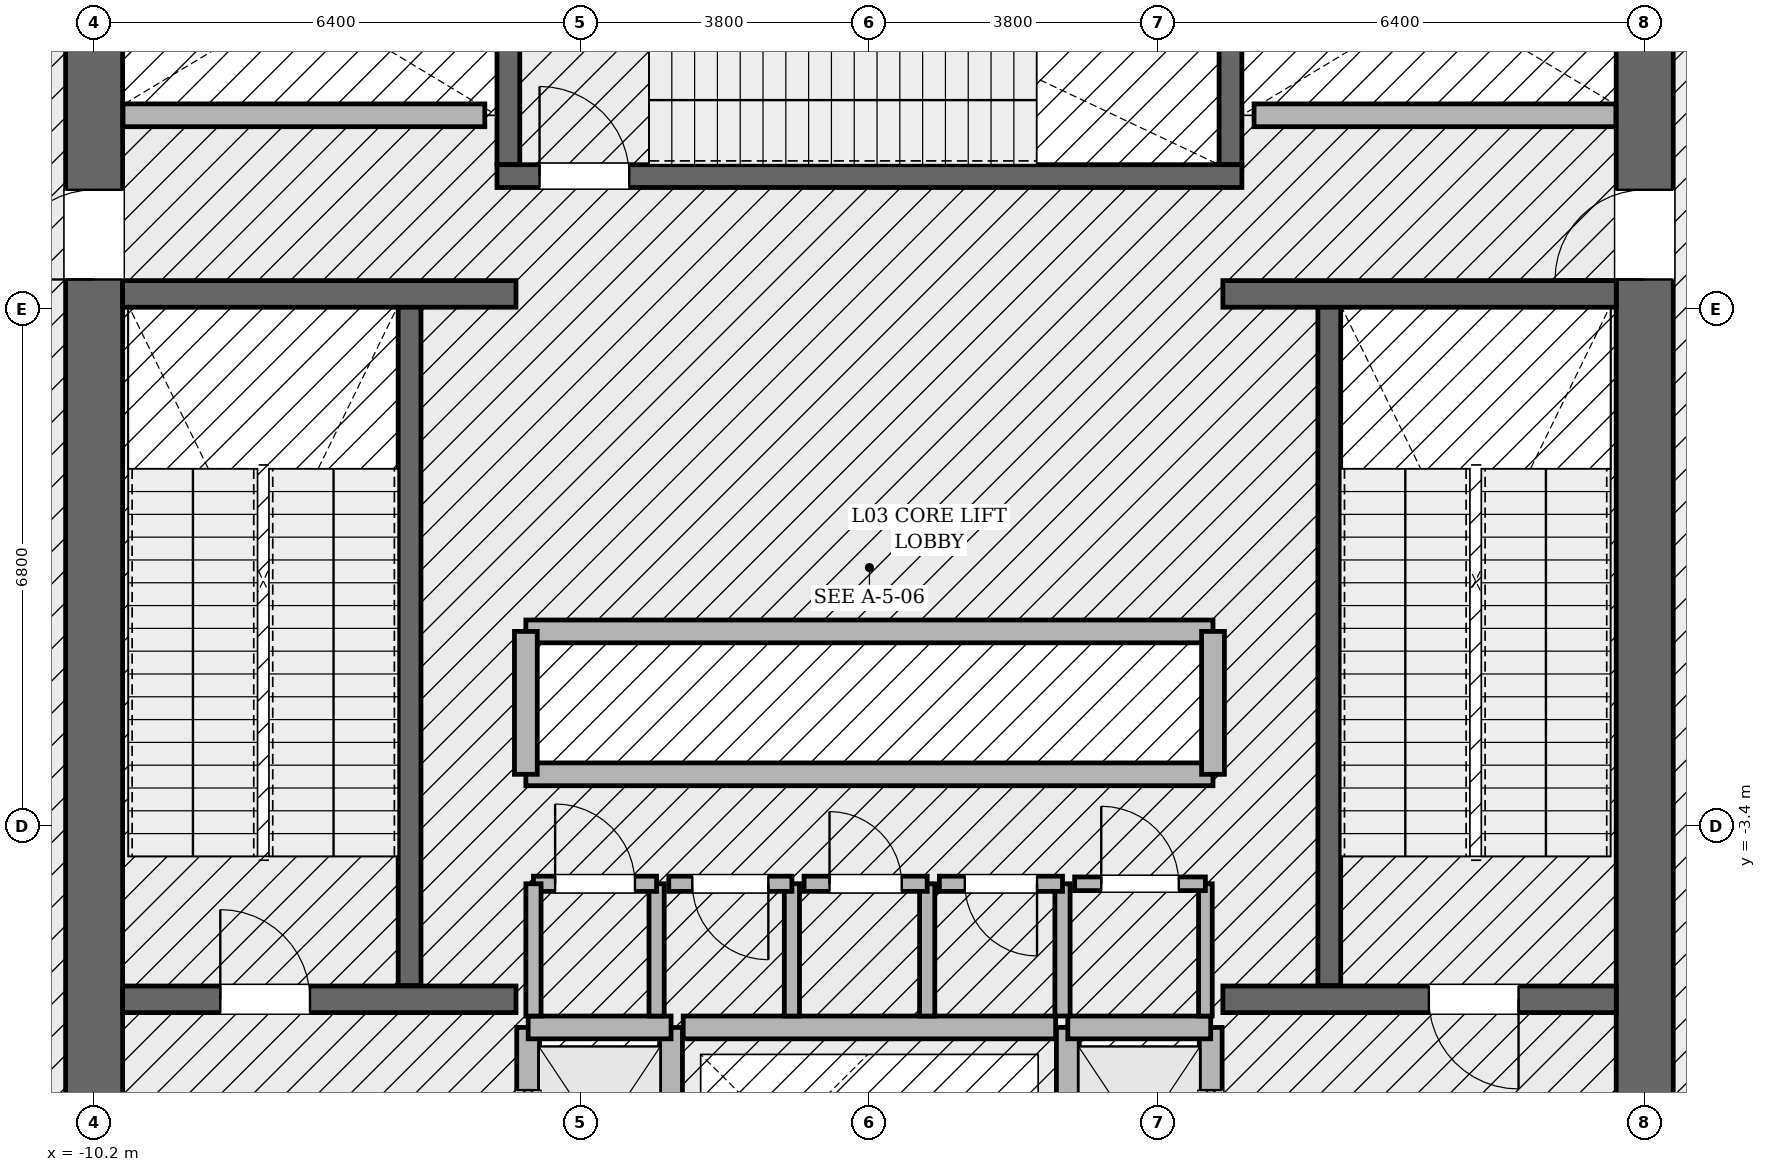
"""IFC4 building model, lengths in metres.
Left out: names, types, materials, properties, quantities, classifications, styles, units other than length and angle.
Written with IfcOpenShell. Run it as: python <this file> out.ifc"""

import sys

from ifc_helpers import new_model, si_unit, direction, frame, frame_2d, origin, place, context, subcontext, project, spatial, rectangle, extrude, element, fill, save


model = new_model("IFC4")
c1 = context("Model", 3, precision=1e-05, world=origin(), true_north=direction((0.0, 1.0)))
c2 = subcontext(c1, "Body", "Model", "MODEL_VIEW")
j1 = project(units=[si_unit("LENGTHUNIT", "METRE"), si_unit("PLANEANGLEUNIT", "RADIAN")], contexts=[c1])
p1 = place(None, origin())
s1 = spatial("IfcSite", under=j1, at=p1, CompositionType="ELEMENT")
p2 = place(p1, origin())
s2 = spatial("IfcBuilding", under=s1, at=p2, CompositionType="ELEMENT")
p3 = place(p2, frame((0.0, 0.0, 16.8)))
s3 = spatial("IfcBuildingStorey", under=s2, at=p3, CompositionType="ELEMENT", Elevation=16.8)
p4 = place(p3, frame((-10.2, -8.825, 0.0), z_axis=(0.0, 0.0, 1.0), x_axis=(0.0, 1.0, 0.0)))
e1 = element("IfcWall", 1, at=p4, inside=s3, PredefinedType="SHEAR", context=c2, shape_type="SweptSolid", body=[
    extrude(rectangle(XDim=17.65, YDim=0.75, at=frame_2d((8.825, 0.0))), origin(), (0.0, 0.0, 1.0), 5.4),
])
p5 = place(p4, frame((12.615, 0.0, 0.0)))
e2 = element("IfcOpeningElement", 2, at=p5, cuts=e1, PredefinedType="OPENING", context=c2, shape_type="SweptSolid", body=[
    extrude(rectangle(XDim=1.18, YDim=2.2, at=frame_2d((0.59, 1.1))), frame((0.0, 0.385, 0.0), z_axis=(0.0, -1.0, 0.0), x_axis=(1.0, 0.0, 0.0)), (0.0, 0.0, 1.0), 0.77),
])
p6 = place(p3, frame((10.2, 8.825, 0.0), z_axis=(0.0, 0.0, 1.0), x_axis=(0.0, -1.0, 0.0)))
e3 = element("IfcWall", 3, at=p6, inside=s3, PredefinedType="SHEAR", context=c2, shape_type="SweptSolid", body=[
    extrude(rectangle(XDim=17.65, YDim=0.75, at=frame_2d((8.825, 0.0))), origin(), (0.0, 0.0, 1.0), 5.4),
])
p7 = place(p6, frame((3.855, 0.0, 0.0)))
e4 = element("IfcOpeningElement", 4, at=p7, cuts=e3, PredefinedType="OPENING", context=c2, shape_type="SweptSolid", body=[
    extrude(rectangle(XDim=1.18, YDim=2.2, at=frame_2d((0.59, 1.1))), frame((0.0, 0.385, 0.0), z_axis=(0.0, -1.0, 0.0), x_axis=(1.0, 0.0, 0.0)), (0.0, 0.0, 1.0), 0.77),
])
for number, where, z_axis, x_axis in (
    (5, (-6.05, -5.5, 0.0), (0.0, 0.0, 1.0), (0.0, 1.0, 0.0)),
    (6, (6.05, 3.45, 0.0), (0.0, 0.0, 1.0), (0.0, -1.0, 0.0)),
):
    element("IfcWall", number, at=place(p3, frame(where, z_axis=z_axis, x_axis=x_axis)), inside=s3, PredefinedType="SOLIDWALL", context=c2, shape_type="SweptSolid", body=[
        extrude(rectangle(XDim=8.95, YDim=0.3, at=frame_2d((4.475, 0.0))), origin(), (0.0, 0.0, 1.0), 5.4),
    ])
for number, where, z_axis, x_axis in (
    (7, (-4.75, 5.3, 0.0), (0.0, 0.0, 1.0), (0.0, 1.0, 0.0)),
    (8, (4.75, 8.825, 0.0), (0.0, 0.0, 1.0), (0.0, -1.0, 0.0)),
):
    element("IfcWall", number, at=place(p3, frame(where, z_axis=z_axis, x_axis=x_axis)), inside=s3, PredefinedType="SOLIDWALL", context=c2, shape_type="SweptSolid", body=[
        extrude(rectangle(XDim=3.525, YDim=0.3, at=frame_2d((1.762, 0.0))), origin(), (0.0, 0.0, 1.0), 5.4),
    ])
p8 = place(p3, frame((-4.9, 5.15, 0.0), z_axis=(0.0, 0.0, 1.0), x_axis=(1.0, 0.0, 0.0)))
e9 = element("IfcWall", 9, at=p8, inside=s3, PredefinedType="SOLIDWALL", context=c2, shape_type="SweptSolid", body=[
    extrude(rectangle(XDim=9.8, YDim=0.3, at=frame_2d((4.9, 0.0))), origin(), (0.0, 0.0, 1.0), 5.4),
])
p9 = place(p8, frame((0.56, 0.0, 0.0)))
e10 = element("IfcOpeningElement", 10, at=p9, cuts=e9, PredefinedType="OPENING", context=c2, shape_type="SweptSolid", body=[
    extrude(rectangle(XDim=1.18, YDim=2.2, at=frame_2d((0.59, 1.1))), frame((0.0, 0.16, 0.0), z_axis=(0.0, -1.0, 0.0), x_axis=(1.0, 0.0, 0.0)), (0.0, 0.0, 1.0), 0.32),
])
p10 = place(p3, frame((-9.825, -5.68, 0.0), z_axis=(0.0, 0.0, 1.0), x_axis=(1.0, 0.0, 0.0)))
e11 = element("IfcWall", 11, at=p10, inside=s3, PredefinedType="SOLIDWALL", context=c2, shape_type="SweptSolid", body=[
    extrude(rectangle(XDim=5.175, YDim=0.35, at=frame_2d((2.587, 0.0))), origin(), (0.0, 0.0, 1.0), 5.4),
])
p11 = place(p10, frame((1.285, 0.0, 0.0)))
e12 = element("IfcOpeningElement", 12, at=p11, cuts=e11, PredefinedType="OPENING", context=c2, shape_type="SweptSolid", body=[
    extrude(rectangle(XDim=1.18, YDim=2.2, at=frame_2d((0.59, 1.1))), frame((0.0, 0.185, 0.0), z_axis=(0.0, -1.0, 0.0), x_axis=(1.0, 0.0, 0.0)), (0.0, 0.0, 1.0), 0.37),
])
p12 = place(p3, frame((4.65, -5.68, 0.0), z_axis=(0.0, 0.0, 1.0), x_axis=(1.0, 0.0, 0.0)))
e13 = element("IfcWall", 13, at=p12, inside=s3, PredefinedType="SOLIDWALL", context=c2, shape_type="SweptSolid", body=[
    extrude(rectangle(XDim=5.175, YDim=0.35, at=frame_2d((2.587, 0.0))), origin(), (0.0, 0.0, 1.0), 5.4),
])
p13 = place(p12, frame((2.71, 0.0, 0.0)))
e14 = element("IfcOpeningElement", 14, at=p13, cuts=e13, PredefinedType="OPENING", context=c2, shape_type="SweptSolid", body=[
    extrude(rectangle(XDim=1.18, YDim=2.2, at=frame_2d((0.59, 1.1))), frame((0.0, 0.185, 0.0), z_axis=(0.0, -1.0, 0.0), x_axis=(1.0, 0.0, 0.0)), (0.0, 0.0, 1.0), 0.37),
])
for number, where, z_axis, x_axis in (
    (15, (-9.825, 3.6, 0.0), (0.0, 0.0, 1.0), (1.0, 0.0, 0.0)),
    (16, (4.65, 3.6, 0.0), (0.0, 0.0, 1.0), (1.0, 0.0, 0.0)),
):
    element("IfcWall", number, at=place(p3, frame(where, z_axis=z_axis, x_axis=x_axis)), inside=s3, PredefinedType="SOLIDWALL", context=c2, shape_type="SweptSolid", body=[
        extrude(rectangle(XDim=5.175, YDim=0.35, at=frame_2d((2.587, 0.0))), origin(), (0.0, 0.0, 1.0), 5.4),
    ])
p14 = place(p3, frame((-4.49, -8.82, 0.0), z_axis=(0.0, 0.0, 1.0), x_axis=(0.0, 1.0, 0.0)))
e17 = element("IfcWall", 17, at=p14, inside=s3, PredefinedType="SOLIDWALL", context=c2, shape_type="SweptSolid", body=[
    extrude(rectangle(XDim=2.77, YDim=0.3, at=frame_2d((1.385, 0.0))), origin(), (0.0, 0.0, 1.0), 5.02),
])
p15 = place(p14, frame((0.825, 0.0, 0.0)))
e18 = element("IfcOpeningElement", 18, at=p15, cuts=e17, PredefinedType="OPENING", context=c2, shape_type="SweptSolid", body=[
    extrude(rectangle(XDim=1.12, YDim=2.25, at=frame_2d((0.56, 1.125))), frame((0.0, 0.16, 0.0), z_axis=(0.0, -1.0, 0.0), x_axis=(1.0, 0.0, 0.0)), (0.0, 0.0, 1.0), 0.32),
])
p16 = place(p3, frame((-2.61, -8.82, 0.0), z_axis=(0.0, 0.0, 1.0), x_axis=(0.0, 1.0, 0.0)))
e19 = element("IfcWall", 19, at=p16, inside=s3, PredefinedType="SOLIDWALL", context=c2, shape_type="SweptSolid", body=[
    extrude(rectangle(XDim=2.77, YDim=0.3, at=frame_2d((1.385, 0.0))), origin(), (0.0, 0.0, 1.0), 5.02),
])
p17 = place(p3, frame((-4.49, -6.05, 0.0), z_axis=(0.0, 0.0, 1.0), x_axis=(1.0, 0.0, 0.0)))
e20 = element("IfcWall", 20, at=p17, inside=s3, PredefinedType="SOLIDWALL", context=c2, shape_type="SweptSolid", body=[
    extrude(rectangle(XDim=1.88, YDim=0.3, at=frame_2d((0.94, 0.0))), origin(), (0.0, 0.0, 1.0), 5.02),
])
p18 = place(p3, frame((4.49, -8.82, 0.0), z_axis=(0.0, 0.0, 1.0), x_axis=(0.0, 1.0, 0.0)))
e21 = element("IfcWall", 21, at=p18, inside=s3, PredefinedType="SOLIDWALL", context=c2, shape_type="SweptSolid", body=[
    extrude(rectangle(XDim=2.77, YDim=0.3, at=frame_2d((1.385, 0.0))), origin(), (0.0, 0.0, 1.0), 5.02),
])
p19 = place(p18, frame((0.825, 0.0, 0.0)))
e22 = element("IfcOpeningElement", 22, at=p19, cuts=e21, PredefinedType="OPENING", context=c2, shape_type="SweptSolid", body=[
    extrude(rectangle(XDim=1.12, YDim=2.25, at=frame_2d((0.56, 1.125))), frame((0.0, 0.16, 0.0), z_axis=(0.0, -1.0, 0.0), x_axis=(1.0, 0.0, 0.0)), (0.0, 0.0, 1.0), 0.32),
])
p20 = place(p3, frame((2.61, -8.82, 0.0), z_axis=(0.0, 0.0, 1.0), x_axis=(0.0, 1.0, 0.0)))
e23 = element("IfcWall", 23, at=p20, inside=s3, PredefinedType="SOLIDWALL", context=c2, shape_type="SweptSolid", body=[
    extrude(rectangle(XDim=2.77, YDim=0.3, at=frame_2d((1.385, 0.0))), origin(), (0.0, 0.0, 1.0), 5.02),
])
p21 = place(p3, frame((2.61, -6.05, 0.0), z_axis=(0.0, 0.0, 1.0), x_axis=(1.0, 0.0, 0.0)))
e24 = element("IfcWall", 24, at=p21, inside=s3, PredefinedType="SOLIDWALL", context=c2, shape_type="SweptSolid", body=[
    extrude(rectangle(XDim=1.88, YDim=0.3, at=frame_2d((0.94, 0.0))), origin(), (0.0, 0.0, 1.0), 5.02),
])
for number, where, z_axis, x_axis in (
    (25, (-4.52, -0.84, 0.0), (0.0, 0.0, 1.0), (1.0, 0.0, 0.0)),
    (26, (-4.52, -2.72, 0.0), (0.0, 0.0, 1.0), (1.0, 0.0, 0.0)),
):
    element("IfcWall", number, at=place(p3, frame(where, z_axis=z_axis, x_axis=x_axis)), inside=s3, PredefinedType="SOLIDWALL", context=c2, shape_type="SweptSolid", body=[
        extrude(rectangle(XDim=9.04, YDim=0.3, at=frame_2d((4.52, 0.0))), origin(), (0.0, 0.0, 1.0), 5.02),
    ])
for number, where, z_axis, x_axis in (
    (27, (-4.52, -2.72, 0.0), (0.0, 0.0, 1.0), (0.0, 1.0, 0.0)),
    (28, (4.52, -2.72, 0.0), (0.0, 0.0, 1.0), (0.0, 1.0, 0.0)),
):
    element("IfcWall", number, at=place(p3, frame(where, z_axis=z_axis, x_axis=x_axis)), inside=s3, PredefinedType="SOLIDWALL", context=c2, shape_type="SweptSolid", body=[
        extrude(rectangle(XDim=1.88, YDim=0.3, at=frame_2d((0.94, 0.0))), origin(), (0.0, 0.0, 1.0), 5.02),
    ])
for number, where, z_axis, x_axis in (
    (29, (-9.82, 5.95, 0.0), (0.0, 0.0, 1.0), (1.0, 0.0, 0.0)),
    (30, (5.06, 5.95, 0.0), (0.0, 0.0, 1.0), (1.0, 0.0, 0.0)),
):
    element("IfcWall", number, at=place(p3, frame(where, z_axis=z_axis, x_axis=x_axis)), inside=s3, PredefinedType="SOLIDWALL", context=c2, shape_type="SweptSolid", body=[
        extrude(rectangle(XDim=4.76, YDim=0.3, at=frame_2d((2.38, 0.0))), origin(), (0.0, 0.0, 1.0), 5.02),
    ])
p22 = place(p3, frame((-2.45, -6.05, 0.0), z_axis=(0.0, 0.0, 1.0), x_axis=(1.0, 0.0, 0.0)))
e31 = element("IfcWall", 31, at=p22, inside=s3, PredefinedType="SOLIDWALL", context=c2, shape_type="SweptSolid", body=[
    extrude(rectangle(XDim=4.9, YDim=0.3, at=frame_2d((2.45, 0.0))), origin(), (0.0, 0.0, 1.0), 5.02),
])
p23 = place(p3, frame((-2.8, -5.9, 0.0), z_axis=(0.0, 0.0, 1.0), x_axis=(0.0, 1.0, 0.0)))
e32 = element("IfcWall", 32, at=p23, inside=s3, PredefinedType="SOLIDWALL", context=c2, shape_type="SweptSolid", body=[
    extrude(rectangle(XDim=1.74, YDim=0.2, at=frame_2d((0.87, 0.0))), origin(), (0.0, 0.0, 1.0), 5.02),
])
p24 = place(p3, frame((-2.8, -4.16, 0.0), z_axis=(0.0, 0.0, 1.0), x_axis=(-1.0, 0.0, 0.0)))
e33 = element("IfcWall", 33, at=p24, inside=s3, PredefinedType="SOLIDWALL", context=c2, shape_type="SweptSolid", body=[
    extrude(rectangle(XDim=1.62, YDim=0.2, at=frame_2d((0.81, 0.0))), origin(), (0.0, 0.0, 1.0), 5.02),
])
p25 = place(p24, frame((0.285, 0.0, 0.0)))
e34 = element("IfcOpeningElement", 34, at=p25, cuts=e33, PredefinedType="OPENING", context=c2, shape_type="SweptSolid", body=[
    extrude(rectangle(XDim=1.05, YDim=2.2, at=frame_2d((0.525, 1.1))), frame((0.0, 0.11, 0.0), z_axis=(0.0, -1.0, 0.0), x_axis=(1.0, 0.0, 0.0)), (0.0, 0.0, 1.0), 0.22),
])
for number, where, z_axis, x_axis in (
    (35, (-4.42, -4.16, 0.0), (0.0, 0.0, 1.0), (0.0, -1.0, 0.0)),
    (36, (-1.02, -5.9, 0.0), (0.0, 0.0, 1.0), (0.0, 1.0, 0.0)),
):
    element("IfcWall", number, at=place(p3, frame(where, z_axis=z_axis, x_axis=x_axis)), inside=s3, PredefinedType="SOLIDWALL", context=c2, shape_type="SweptSolid", body=[
        extrude(rectangle(XDim=1.74, YDim=0.2, at=frame_2d((0.87, 0.0))), origin(), (0.0, 0.0, 1.0), 5.02),
    ])
p26 = place(p3, frame((-1.02, -4.16, 0.0), z_axis=(0.0, 0.0, 1.0), x_axis=(-1.0, 0.0, 0.0)))
e37 = element("IfcWall", 37, at=p26, inside=s3, PredefinedType="SOLIDWALL", context=c2, shape_type="SweptSolid", body=[
    extrude(rectangle(XDim=1.62, YDim=0.2, at=frame_2d((0.81, 0.0))), origin(), (0.0, 0.0, 1.0), 5.02),
])
p27 = place(p26, frame((0.31, 0.0, 0.0)))
e38 = element("IfcOpeningElement", 38, at=p27, cuts=e37, PredefinedType="OPENING", context=c2, shape_type="SweptSolid", body=[
    extrude(rectangle(XDim=1.0, YDim=2.15, at=frame_2d((0.5, 1.075))), frame((0.0, 0.11, 0.0), z_axis=(0.0, -1.0, 0.0), x_axis=(1.0, 0.0, 0.0)), (0.0, 0.0, 1.0), 0.22),
])
p28 = place(p3, frame((0.76, -5.9, 0.0), z_axis=(0.0, 0.0, 1.0), x_axis=(0.0, 1.0, 0.0)))
e39 = element("IfcWall", 39, at=p28, inside=s3, PredefinedType="SOLIDWALL", context=c2, shape_type="SweptSolid", body=[
    extrude(rectangle(XDim=1.74, YDim=0.2, at=frame_2d((0.87, 0.0))), origin(), (0.0, 0.0, 1.0), 5.02),
])
p29 = place(p3, frame((0.76, -4.16, 0.0), z_axis=(0.0, 0.0, 1.0), x_axis=(-1.0, 0.0, 0.0)))
e40 = element("IfcWall", 40, at=p29, inside=s3, PredefinedType="SOLIDWALL", context=c2, shape_type="SweptSolid", body=[
    extrude(rectangle(XDim=1.62, YDim=0.2, at=frame_2d((0.81, 0.0))), origin(), (0.0, 0.0, 1.0), 5.02),
])
p30 = place(p29, frame((0.335, 0.0, 0.0)))
e41 = element("IfcOpeningElement", 41, at=p30, cuts=e40, PredefinedType="OPENING", context=c2, shape_type="SweptSolid", body=[
    extrude(rectangle(XDim=0.95, YDim=2.15, at=frame_2d((0.475, 1.075))), frame((0.0, 0.11, 0.0), z_axis=(0.0, -1.0, 0.0), x_axis=(1.0, 0.0, 0.0)), (0.0, 0.0, 1.0), 0.22),
])
p31 = place(p3, frame((2.54, -5.9, 0.0), z_axis=(0.0, 0.0, 1.0), x_axis=(0.0, 1.0, 0.0)))
e42 = element("IfcWall", 42, at=p31, inside=s3, PredefinedType="SOLIDWALL", context=c2, shape_type="SweptSolid", body=[
    extrude(rectangle(XDim=1.74, YDim=0.2, at=frame_2d((0.87, 0.0))), origin(), (0.0, 0.0, 1.0), 5.02),
])
p32 = place(p3, frame((2.54, -4.16, 0.0), z_axis=(0.0, 0.0, 1.0), x_axis=(-1.0, 0.0, 0.0)))
e43 = element("IfcWall", 43, at=p32, inside=s3, PredefinedType="SOLIDWALL", context=c2, shape_type="SweptSolid", body=[
    extrude(rectangle(XDim=1.62, YDim=0.2, at=frame_2d((0.81, 0.0))), origin(), (0.0, 0.0, 1.0), 5.02),
])
p33 = place(p32, frame((0.335, 0.0, 0.0)))
e44 = element("IfcOpeningElement", 44, at=p33, cuts=e43, PredefinedType="OPENING", context=c2, shape_type="SweptSolid", body=[
    extrude(rectangle(XDim=0.95, YDim=2.15, at=frame_2d((0.475, 1.075))), frame((0.0, 0.11, 0.0), z_axis=(0.0, -1.0, 0.0), x_axis=(1.0, 0.0, 0.0)), (0.0, 0.0, 1.0), 0.22),
])
p34 = place(p3, frame((4.42, -5.9, 0.0), z_axis=(0.0, 0.0, 1.0), x_axis=(0.0, 1.0, 0.0)))
e45 = element("IfcWall", 45, at=p34, inside=s3, PredefinedType="PARTITIONING", context=c2, shape_type="SweptSolid", body=[
    extrude(rectangle(XDim=1.74, YDim=0.18, at=frame_2d((0.87, 0.0))), origin(), (0.0, 0.0, 1.0), 5.02),
])
p35 = place(p3, frame((4.42, -4.16, 0.0), z_axis=(0.0, 0.0, 1.0), x_axis=(-1.0, 0.0, 0.0)))
e46 = element("IfcWall", 46, at=p35, inside=s3, PredefinedType="PARTITIONING", context=c2, shape_type="SweptSolid", body=[
    extrude(rectangle(XDim=1.72, YDim=0.18, at=frame_2d((0.86, 0.0))), origin(), (0.0, 0.0, 1.0), 5.02),
])
p36 = place(p35, frame((0.35, 0.0, 0.0)))
e47 = element("IfcOpeningElement", 47, at=p36, cuts=e46, PredefinedType="OPENING", context=c2, shape_type="SweptSolid", body=[
    extrude(rectangle(XDim=1.02, YDim=2.2, at=frame_2d((0.51, 1.1))), frame((0.0, 0.1, 0.0), z_axis=(0.0, -1.0, 0.0), x_axis=(1.0, 0.0, 0.0)), (0.0, 0.0, 1.0), 0.2),
])
p37 = place(p11, origin())
e48 = element("IfcDoor", 48, at=p37, inside=s3, OperationType="SINGLE_SWING_LEFT", PredefinedType="DOOR", context=c2, shape_type="SweptSolid", body=[
    extrude(rectangle(XDim=1.18, YDim=2.2, at=frame_2d((0.59, 1.1))), frame((0.0, 0.025, 0.0), z_axis=(0.0, -1.0, 0.0), x_axis=(1.0, 0.0, 0.0)), (0.0, 0.0, 1.0), 0.05),
])
fill(e12, e48)
p38 = place(p13, origin())
e49 = element("IfcDoor", 49, at=p38, inside=s3, OperationType="SINGLE_SWING_RIGHT", PredefinedType="DOOR", context=c2, shape_type="SweptSolid", body=[
    extrude(rectangle(XDim=1.18, YDim=2.2, at=frame_2d((0.59, 1.1))), frame((0.0, 0.025, 0.0), z_axis=(0.0, -1.0, 0.0), x_axis=(1.0, 0.0, 0.0)), (0.0, 0.0, 1.0), 0.05),
])
fill(e14, e49)
p39 = place(p9, origin())
e50 = element("IfcDoor", 50, at=p39, inside=s3, OperationType="SINGLE_SWING_LEFT", PredefinedType="DOOR", context=c2, shape_type="SweptSolid", body=[
    extrude(rectangle(XDim=1.18, YDim=2.2, at=frame_2d((0.59, 1.1))), frame((0.0, 0.025, 0.0), z_axis=(0.0, -1.0, 0.0), x_axis=(1.0, 0.0, 0.0)), (0.0, 0.0, 1.0), 0.05),
])
fill(e10, e50)
p40 = place(p5, origin())
e51 = element("IfcDoor", 51, at=p40, inside=s3, OperationType="SINGLE_SWING_LEFT", PredefinedType="DOOR", context=c2, shape_type="SweptSolid", body=[
    extrude(rectangle(XDim=1.18, YDim=2.2, at=frame_2d((0.59, 1.1))), frame((0.0, 0.025, 0.0), z_axis=(0.0, -1.0, 0.0), x_axis=(1.0, 0.0, 0.0)), (0.0, 0.0, 1.0), 0.05),
])
fill(e2, e51)
p41 = place(p7, origin())
e52 = element("IfcDoor", 52, at=p41, inside=s3, OperationType="SINGLE_SWING_RIGHT", PredefinedType="DOOR", context=c2, shape_type="SweptSolid", body=[
    extrude(rectangle(XDim=1.18, YDim=2.2, at=frame_2d((0.59, 1.1))), frame((0.0, 0.025, 0.0), z_axis=(0.0, -1.0, 0.0), x_axis=(1.0, 0.0, 0.0)), (0.0, 0.0, 1.0), 0.05),
])
fill(e4, e52)
p42 = place(p15, origin())
e53 = element("IfcDoor", 53, at=p42, inside=s3, OperationType="SLIDING_TO_LEFT", PredefinedType="DOOR", context=c2, shape_type="SweptSolid", body=[
    extrude(rectangle(XDim=1.12, YDim=2.25, at=frame_2d((0.56, 1.125))), frame((0.0, 0.025, 0.0), z_axis=(0.0, -1.0, 0.0), x_axis=(1.0, 0.0, 0.0)), (0.0, 0.0, 1.0), 0.05),
])
fill(e18, e53)
p43 = place(p19, origin())
e54 = element("IfcDoor", 54, at=p43, inside=s3, OperationType="SLIDING_TO_RIGHT", PredefinedType="DOOR", context=c2, shape_type="SweptSolid", body=[
    extrude(rectangle(XDim=1.12, YDim=2.25, at=frame_2d((0.56, 1.125))), frame((0.0, 0.025, 0.0), z_axis=(0.0, -1.0, 0.0), x_axis=(1.0, 0.0, 0.0)), (0.0, 0.0, 1.0), 0.05),
])
fill(e22, e54)
p44 = place(p25, origin())
e55 = element("IfcDoor", 55, at=p44, inside=s3, OperationType="SINGLE_SWING_RIGHT", PredefinedType="DOOR", context=c2, shape_type="SweptSolid", body=[
    extrude(rectangle(XDim=1.05, YDim=2.2, at=frame_2d((0.525, 1.1))), frame((0.0, 0.025, 0.0), z_axis=(0.0, -1.0, 0.0), x_axis=(1.0, 0.0, 0.0)), (0.0, 0.0, 1.0), 0.05),
])
fill(e34, e55)
p45 = place(p27, origin())
e56 = element("IfcDoor", 56, at=p45, inside=s3, OperationType="SINGLE_SWING_LEFT", PredefinedType="DOOR", context=c2, shape_type="SweptSolid", body=[
    extrude(rectangle(XDim=1.0, YDim=2.15, at=frame_2d((0.5, 1.075))), frame((0.0, 0.025, 0.0), z_axis=(0.0, -1.0, 0.0), x_axis=(1.0, 0.0, 0.0)), (0.0, 0.0, 1.0), 0.05),
])
fill(e38, e56)
p46 = place(p30, origin())
e57 = element("IfcDoor", 57, at=p46, inside=s3, OperationType="SINGLE_SWING_RIGHT", PredefinedType="DOOR", context=c2, shape_type="SweptSolid", body=[
    extrude(rectangle(XDim=0.95, YDim=2.15, at=frame_2d((0.475, 1.075))), frame((0.0, 0.025, 0.0), z_axis=(0.0, -1.0, 0.0), x_axis=(1.0, 0.0, 0.0)), (0.0, 0.0, 1.0), 0.05),
])
fill(e41, e57)
p47 = place(p33, origin())
e58 = element("IfcDoor", 58, at=p47, inside=s3, OperationType="SINGLE_SWING_LEFT", PredefinedType="DOOR", context=c2, shape_type="SweptSolid", body=[
    extrude(rectangle(XDim=0.95, YDim=2.15, at=frame_2d((0.475, 1.075))), frame((0.0, 0.025, 0.0), z_axis=(0.0, -1.0, 0.0), x_axis=(1.0, 0.0, 0.0)), (0.0, 0.0, 1.0), 0.05),
])
fill(e44, e58)
p48 = place(p36, origin())
e59 = element("IfcDoor", 59, at=p48, inside=s3, OperationType="SINGLE_SWING_RIGHT", PredefinedType="DOOR", context=c2, shape_type="SweptSolid", body=[
    extrude(rectangle(XDim=1.02, YDim=2.2, at=frame_2d((0.51, 1.1))), frame((0.0, 0.025, 0.0), z_axis=(0.0, -1.0, 0.0), x_axis=(1.0, 0.0, 0.0)), (0.0, 0.0, 1.0), 0.05),
])
fill(e47, e59)
save(model, sys.argv[1])
